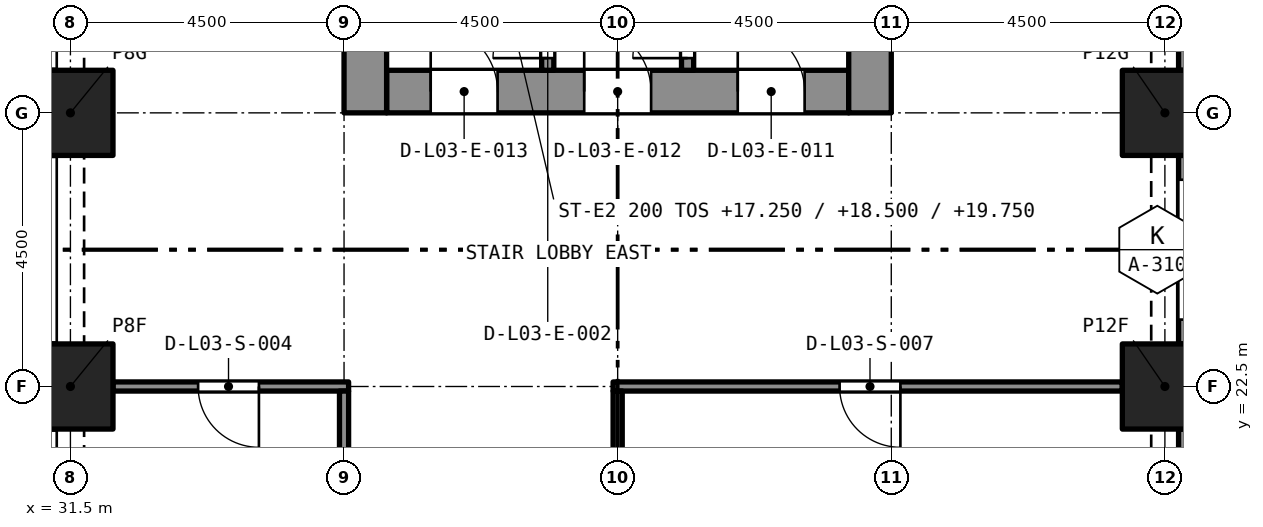
"""IFC4 building model, lengths in metres.
Left out: names, types, materials, properties, quantities, classifications, styles, units other than length and angle.
Written with IfcOpenShell. Run it as: python <this file> out.ifc"""

import sys

from ifc_helpers import new_model, si_unit, direction, frame, frame_2d, origin, origin_2d, place, context, subcontext, project, spatial, rectangle, extrude, element, fill, save


model = new_model("IFC4")
c1 = context("Model", 3, precision=1e-05, world=origin(), true_north=direction((0.0, 1.0)))
c2 = subcontext(c1, "Body", "Model", "MODEL_VIEW")
j1 = project(units=[si_unit("LENGTHUNIT", "METRE"), si_unit("PLANEANGLEUNIT", "RADIAN")], contexts=[c1])
p1 = place(None, origin())
s1 = spatial("IfcSite", under=j1, at=p1, CompositionType="ELEMENT")
p2 = place(p1, origin())
s2 = spatial("IfcBuilding", under=s1, at=p2, CompositionType="ELEMENT")
p3 = place(p2, frame((0.0, 0.0, 16.0)))
s3 = spatial("IfcBuildingStorey", under=s2, at=p3, CompositionType="ELEMENT", Elevation=16.0)
for number, where, z_axis, x_axis in (
    (1, (31.5, 22.5, 0.0), (0.0, 0.0, 1.0), (1.0, 0.0, 0.0)),
    (2, (49.5, 22.5, 0.0), (0.0, 0.0, 1.0), (1.0, 0.0, 0.0)),
    (3, (31.5, 27.0, 0.0), (0.0, 0.0, 1.0), (1.0, 0.0, 0.0)),
    (4, (49.5, 27.0, 0.0), (0.0, 0.0, 1.0), (1.0, 0.0, 0.0)),
):
    element("IfcColumn", number, at=place(p3, frame(where, z_axis=z_axis, x_axis=x_axis)), inside=s3, PredefinedType="COLUMN", context=c2, shape_type="SweptSolid", body=[
        extrude(rectangle(XDim=1.4, YDim=1.4, at=origin_2d()), origin(), (0.0, 0.0, 1.0), 5.0),
    ])
p4 = place(p3, frame((36.7, 27.35, 0.0), z_axis=(0.0, 0.0, 1.0), x_axis=(1.0, 0.0, 0.0)))
e5 = element("IfcWall", 5, at=p4, inside=s3, PredefinedType="SOLIDWALL", context=c2, shape_type="SweptSolid", body=[
    extrude(rectangle(XDim=7.6, YDim=0.7, at=frame_2d((3.8, 0.0))), origin(), (0.0, 0.0, 1.0), 5.0),
])
p5 = place(p4, frame((5.775, 0.0, 0.0)))
e6 = element("IfcOpeningElement", 6, at=p5, cuts=e5, PredefinedType="OPENING", context=c2, shape_type="SweptSolid", body=[
    extrude(rectangle(XDim=1.1, YDim=2.1, at=frame_2d((0.55, 1.05))), frame((0.0, 0.36, 0.0), z_axis=(0.0, -1.0, 0.0), x_axis=(1.0, 0.0, 0.0)), (0.0, 0.0, 1.0), 0.72),
])
p6 = place(p4, frame((3.25, 0.0, 0.0)))
e7 = element("IfcOpeningElement", 7, at=p6, cuts=e5, PredefinedType="OPENING", context=c2, shape_type="SweptSolid", body=[
    extrude(rectangle(XDim=1.1, YDim=2.1, at=frame_2d((0.55, 1.05))), frame((0.0, 0.36, 0.0), z_axis=(0.0, -1.0, 0.0), x_axis=(1.0, 0.0, 0.0)), (0.0, 0.0, 1.0), 0.72),
])
p7 = place(p4, frame((0.725, 0.0, 0.0)))
e8 = element("IfcOpeningElement", 8, at=p7, cuts=e5, PredefinedType="OPENING", context=c2, shape_type="SweptSolid", body=[
    extrude(rectangle(XDim=1.1, YDim=2.1, at=frame_2d((0.55, 1.05))), frame((0.0, 0.36, 0.0), z_axis=(0.0, -1.0, 0.0), x_axis=(1.0, 0.0, 0.0)), (0.0, 0.0, 1.0), 0.72),
])
p8 = place(p3, frame((36.35, 27.0, 0.0), z_axis=(0.0, 0.0, 1.0), x_axis=(0.0, 1.0, 0.0)))
e9 = element("IfcWall", 9, at=p8, inside=s3, PredefinedType="SOLIDWALL", context=c2, shape_type="SweptSolid", body=[
    extrude(rectangle(XDim=13.5, YDim=0.7, at=frame_2d((6.75, 0.0))), origin(), (0.0, 0.0, 1.0), 5.0),
])
p9 = place(p8, frame((8.95, 0.0, 0.0)))
e10 = element("IfcOpeningElement", 10, at=p9, cuts=e9, PredefinedType="OPENING", context=c2, shape_type="SweptSolid", body=[
    extrude(rectangle(XDim=1.2, YDim=2.1, at=frame_2d((0.6, 1.05))), frame((0.0, 0.36, 0.0), z_axis=(0.0, -1.0, 0.0), x_axis=(1.0, 0.0, 0.0)), (0.0, 0.0, 1.0), 0.72),
])
p10 = place(p3, frame((44.65, 27.0, 0.0), z_axis=(0.0, 0.0, 1.0), x_axis=(0.0, 1.0, 0.0)))
e11 = element("IfcWall", 11, at=p10, inside=s3, PredefinedType="SOLIDWALL", context=c2, shape_type="SweptSolid", body=[
    extrude(rectangle(XDim=13.5, YDim=0.7, at=frame_2d((6.75, 0.0))), origin(), (0.0, 0.0, 1.0), 5.0),
])
p11 = place(p10, frame((8.95, 0.0, 0.0)))
e12 = element("IfcOpeningElement", 12, at=p11, cuts=e11, PredefinedType="OPENING", context=c2, shape_type="SweptSolid", body=[
    extrude(rectangle(XDim=1.2, YDim=2.1, at=frame_2d((0.6, 1.05))), frame((0.0, 0.36, 0.0), z_axis=(0.0, -1.0, 0.0), x_axis=(1.0, 0.0, 0.0)), (0.0, 0.0, 1.0), 0.72),
])
p12 = place(p3, frame((49.875, 21.8, 0.0), z_axis=(0.0, 0.0, 1.0), x_axis=(0.0, -1.0, 0.0)))
e13 = element("IfcWall", 13, at=p12, inside=s3, PredefinedType="SOLIDWALL", context=c2, shape_type="SweptSolid", body=[
    extrude(rectangle(XDim=3.1, YDim=0.3, at=frame_2d((1.55, 0.0))), origin(), (0.0, 0.0, 1.0), 5.0),
])
p13 = place(p12, frame((0.4, 0.0, 0.45)))
e14 = element("IfcOpeningElement", 14, at=p13, cuts=e13, PredefinedType="OPENING", context=c2, shape_type="SweptSolid", body=[
    extrude(rectangle(XDim=2.3, YDim=3.3, at=frame_2d((1.15, 1.65))), frame((0.0, 0.16, 0.0), z_axis=(0.0, -1.0, 0.0), x_axis=(1.0, 0.0, 0.0)), (0.0, 0.0, 1.0), 0.32),
])
p14 = place(p3, frame((49.875, 26.3, 0.0), z_axis=(0.0, 0.0, 1.0), x_axis=(0.0, -1.0, 0.0)))
e15 = element("IfcWall", 15, at=p14, inside=s3, PredefinedType="SOLIDWALL", context=c2, shape_type="SweptSolid", body=[
    extrude(rectangle(XDim=3.1, YDim=0.3, at=frame_2d((1.55, 0.0))), origin(), (0.0, 0.0, 1.0), 5.0),
])
p15 = place(p14, frame((0.4, 0.0, 0.45)))
e16 = element("IfcOpeningElement", 16, at=p15, cuts=e15, PredefinedType="OPENING", context=c2, shape_type="SweptSolid", body=[
    extrude(rectangle(XDim=2.3, YDim=3.3, at=frame_2d((1.15, 1.65))), frame((0.0, 0.16, 0.0), z_axis=(0.0, -1.0, 0.0), x_axis=(1.0, 0.0, 0.0)), (0.0, 0.0, 1.0), 0.32),
])
p16 = place(p3, frame((49.875, 30.8, 0.0), z_axis=(0.0, 0.0, 1.0), x_axis=(0.0, -1.0, 0.0)))
e17 = element("IfcWall", 17, at=p16, inside=s3, PredefinedType="SOLIDWALL", context=c2, shape_type="SweptSolid", body=[
    extrude(rectangle(XDim=3.1, YDim=0.3, at=frame_2d((1.55, 0.0))), origin(), (0.0, 0.0, 1.0), 5.0),
])
p17 = place(p16, frame((0.4, 0.0, 0.45)))
e18 = element("IfcOpeningElement", 18, at=p17, cuts=e17, PredefinedType="OPENING", context=c2, shape_type="SweptSolid", body=[
    extrude(rectangle(XDim=2.3, YDim=3.3, at=frame_2d((1.15, 1.65))), frame((0.0, 0.16, 0.0), z_axis=(0.0, -1.0, 0.0), x_axis=(1.0, 0.0, 0.0)), (0.0, 0.0, 1.0), 0.32),
])
p18 = place(p3, frame((41.65, 27.7, 0.0), z_axis=(0.0, 0.0, 1.0), x_axis=(0.0, 1.0, 0.0)))
e19 = element("IfcWall", 19, at=p18, inside=s3, PredefinedType="SOLIDWALL", context=c2, shape_type="SweptSolid", body=[
    extrude(rectangle(XDim=5.4, YDim=0.2, at=frame_2d((2.7, 0.0))), origin(), (0.0, 0.0, 1.0), 4.65),
])
p19 = place(p18, frame((0.2, 0.0, 0.0)))
e20 = element("IfcOpeningElement", 20, at=p19, cuts=e19, PredefinedType="OPENING", context=c2, shape_type="SweptSolid", body=[
    extrude(rectangle(XDim=0.9, YDim=2.1, at=frame_2d((0.45, 1.05))), frame((0.0, 0.11, 0.0), z_axis=(0.0, -1.0, 0.0), x_axis=(1.0, 0.0, 0.0)), (0.0, 0.0, 1.0), 0.22),
])
p20 = place(p3, frame((39.35, 27.7, 0.0), z_axis=(0.0, 0.0, 1.0), x_axis=(0.0, 1.0, 0.0)))
e21 = element("IfcWall", 21, at=p20, inside=s3, PredefinedType="SOLIDWALL", context=c2, shape_type="SweptSolid", body=[
    extrude(rectangle(XDim=5.4, YDim=0.2, at=frame_2d((2.7, 0.0))), origin(), (0.0, 0.0, 1.0), 4.65),
])
p21 = place(p20, frame((0.2, 0.0, 0.0)))
e22 = element("IfcOpeningElement", 22, at=p21, cuts=e21, PredefinedType="OPENING", context=c2, shape_type="SweptSolid", body=[
    extrude(rectangle(XDim=0.9, YDim=2.1, at=frame_2d((0.45, 1.05))), frame((0.0, 0.11, 0.0), z_axis=(0.0, -1.0, 0.0), x_axis=(1.0, 0.0, 0.0)), (0.0, 0.0, 1.0), 0.22),
])
p22 = place(p3, frame((36.075, 22.5, 0.0), z_axis=(0.0, 0.0, 1.0), x_axis=(-1.0, 0.0, 0.0)))
e23 = element("IfcWall", 23, at=p22, inside=s3, PredefinedType="PARTITIONING", context=c2, shape_type="SweptSolid", body=[
    extrude(rectangle(XDim=3.875, YDim=0.15, at=frame_2d((1.938, 0.0))), origin(), (0.0, 0.0, 1.0), 4.65),
])
p23 = place(p22, frame((1.475, 0.0, 0.0)))
e24 = element("IfcOpeningElement", 24, at=p23, cuts=e23, PredefinedType="OPENING", context=c2, shape_type="SweptSolid", body=[
    extrude(rectangle(XDim=1.0, YDim=2.1, at=frame_2d((0.5, 1.05))), frame((0.0, 0.085, 0.0), z_axis=(0.0, -1.0, 0.0), x_axis=(1.0, 0.0, 0.0)), (0.0, 0.0, 1.0), 0.17),
])
p24 = place(p3, frame((36.0, 18.0, 0.0), z_axis=(0.0, 0.0, 1.0), x_axis=(0.0, 1.0, 0.0)))
e25 = element("IfcWall", 25, at=p24, inside=s3, PredefinedType="PARTITIONING", context=c2, shape_type="SweptSolid", body=[
    extrude(rectangle(XDim=4.425, YDim=0.15, at=frame_2d((2.212, 0.0))), origin(), (0.0, 0.0, 1.0), 4.65),
])
p25 = place(p24, frame((1.85, 0.0, 0.0)))
e26 = element("IfcOpeningElement", 26, at=p25, cuts=e25, PredefinedType="OPENING", context=c2, shape_type="SweptSolid", body=[
    extrude(rectangle(XDim=0.8, YDim=2.1, at=frame_2d((0.4, 1.05))), frame((0.0, 0.085, 0.0), z_axis=(0.0, -1.0, 0.0), x_axis=(1.0, 0.0, 0.0)), (0.0, 0.0, 1.0), 0.17),
])
p26 = place(p3, frame((48.8, 22.5, 0.0), z_axis=(0.0, 0.0, 1.0), x_axis=(-1.0, 0.0, 0.0)))
e27 = element("IfcWall", 27, at=p26, inside=s3, PredefinedType="PARTITIONING", context=c2, shape_type="SweptSolid", body=[
    extrude(rectangle(XDim=8.375, YDim=0.15, at=frame_2d((4.188, 0.0))), origin(), (0.0, 0.0, 1.0), 4.65),
])
p27 = place(p26, frame((3.65, 0.0, 0.0)))
e28 = element("IfcOpeningElement", 28, at=p27, cuts=e27, PredefinedType="OPENING", context=c2, shape_type="SweptSolid", body=[
    extrude(rectangle(XDim=1.0, YDim=2.1, at=frame_2d((0.5, 1.05))), frame((0.0, 0.085, 0.0), z_axis=(0.0, -1.0, 0.0), x_axis=(1.0, 0.0, 0.0)), (0.0, 0.0, 1.0), 0.17),
])
p28 = place(p3, frame((40.5, 22.425, 0.0), z_axis=(0.0, 0.0, 1.0), x_axis=(0.0, -1.0, 0.0)))
e29 = element("IfcWall", 29, at=p28, inside=s3, PredefinedType="PARTITIONING", context=c2, shape_type="SweptSolid", body=[
    extrude(rectangle(XDim=8.925, YDim=0.15, at=frame_2d((4.462, 0.0))), origin(), (0.0, 0.0, 1.0), 4.65),
])
p29 = place(p28, frame((3.825, 0.0, 0.0)))
e30 = element("IfcOpeningElement", 30, at=p29, cuts=e29, PredefinedType="OPENING", context=c2, shape_type="SweptSolid", body=[
    extrude(rectangle(XDim=1.2, YDim=2.1, at=frame_2d((0.6, 1.05))), frame((0.0, 0.085, 0.0), z_axis=(0.0, -1.0, 0.0), x_axis=(1.0, 0.0, 0.0)), (0.0, 0.0, 1.0), 0.17),
])
p30 = place(p19, origin())
e31 = element("IfcDoor", 31, at=p30, inside=s3, OperationType="SINGLE_SWING_LEFT", PredefinedType="DOOR", context=c2, shape_type="SweptSolid", body=[
    extrude(rectangle(XDim=0.9, YDim=2.1, at=frame_2d((0.45, 1.05))), frame((0.0, 0.025, 0.0), z_axis=(0.0, -1.0, 0.0), x_axis=(1.0, 0.0, 0.0)), (0.0, 0.0, 1.0), 0.05),
])
fill(e20, e31)
p31 = place(p21, origin())
e32 = element("IfcDoor", 32, at=p31, inside=s3, OperationType="SINGLE_SWING_LEFT", PredefinedType="DOOR", context=c2, shape_type="SweptSolid", body=[
    extrude(rectangle(XDim=0.9, YDim=2.1, at=frame_2d((0.45, 1.05))), frame((0.0, 0.025, 0.0), z_axis=(0.0, -1.0, 0.0), x_axis=(1.0, 0.0, 0.0)), (0.0, 0.0, 1.0), 0.05),
])
fill(e22, e32)
p32 = place(p5, origin())
e33 = element("IfcDoor", 33, at=p32, inside=s3, OperationType="SINGLE_SWING_LEFT", PredefinedType="DOOR", context=c2, shape_type="SweptSolid", body=[
    extrude(rectangle(XDim=1.1, YDim=2.1, at=frame_2d((0.55, 1.05))), frame((0.0, 0.025, 0.0), z_axis=(0.0, -1.0, 0.0), x_axis=(1.0, 0.0, 0.0)), (0.0, 0.0, 1.0), 0.05),
])
fill(e6, e33)
p33 = place(p6, origin())
e34 = element("IfcDoor", 34, at=p33, inside=s3, OperationType="SINGLE_SWING_LEFT", PredefinedType="DOOR", context=c2, shape_type="SweptSolid", body=[
    extrude(rectangle(XDim=1.1, YDim=2.1, at=frame_2d((0.55, 1.05))), frame((0.0, 0.025, 0.0), z_axis=(0.0, -1.0, 0.0), x_axis=(1.0, 0.0, 0.0)), (0.0, 0.0, 1.0), 0.05),
])
fill(e7, e34)
p34 = place(p7, origin())
e35 = element("IfcDoor", 35, at=p34, inside=s3, OperationType="SINGLE_SWING_LEFT", PredefinedType="DOOR", context=c2, shape_type="SweptSolid", body=[
    extrude(rectangle(XDim=1.1, YDim=2.1, at=frame_2d((0.55, 1.05))), frame((0.0, 0.025, 0.0), z_axis=(0.0, -1.0, 0.0), x_axis=(1.0, 0.0, 0.0)), (0.0, 0.0, 1.0), 0.05),
])
fill(e8, e35)
p35 = place(p23, origin())
e36 = element("IfcDoor", 36, at=p35, inside=s3, OperationType="SINGLE_SWING_RIGHT", PredefinedType="DOOR", context=c2, shape_type="SweptSolid", body=[
    extrude(rectangle(XDim=1.0, YDim=2.1, at=frame_2d((0.5, 1.05))), frame((0.0, 0.025, 0.0), z_axis=(0.0, -1.0, 0.0), x_axis=(1.0, 0.0, 0.0)), (0.0, 0.0, 1.0), 0.05),
])
fill(e24, e36)
p36 = place(p27, origin())
e37 = element("IfcDoor", 37, at=p36, inside=s3, OperationType="SINGLE_SWING_LEFT", PredefinedType="DOOR", context=c2, shape_type="SweptSolid", body=[
    extrude(rectangle(XDim=1.0, YDim=2.1, at=frame_2d((0.5, 1.05))), frame((0.0, 0.025, 0.0), z_axis=(0.0, -1.0, 0.0), x_axis=(1.0, 0.0, 0.0)), (0.0, 0.0, 1.0), 0.05),
])
fill(e28, e37)
save(model, sys.argv[1])
